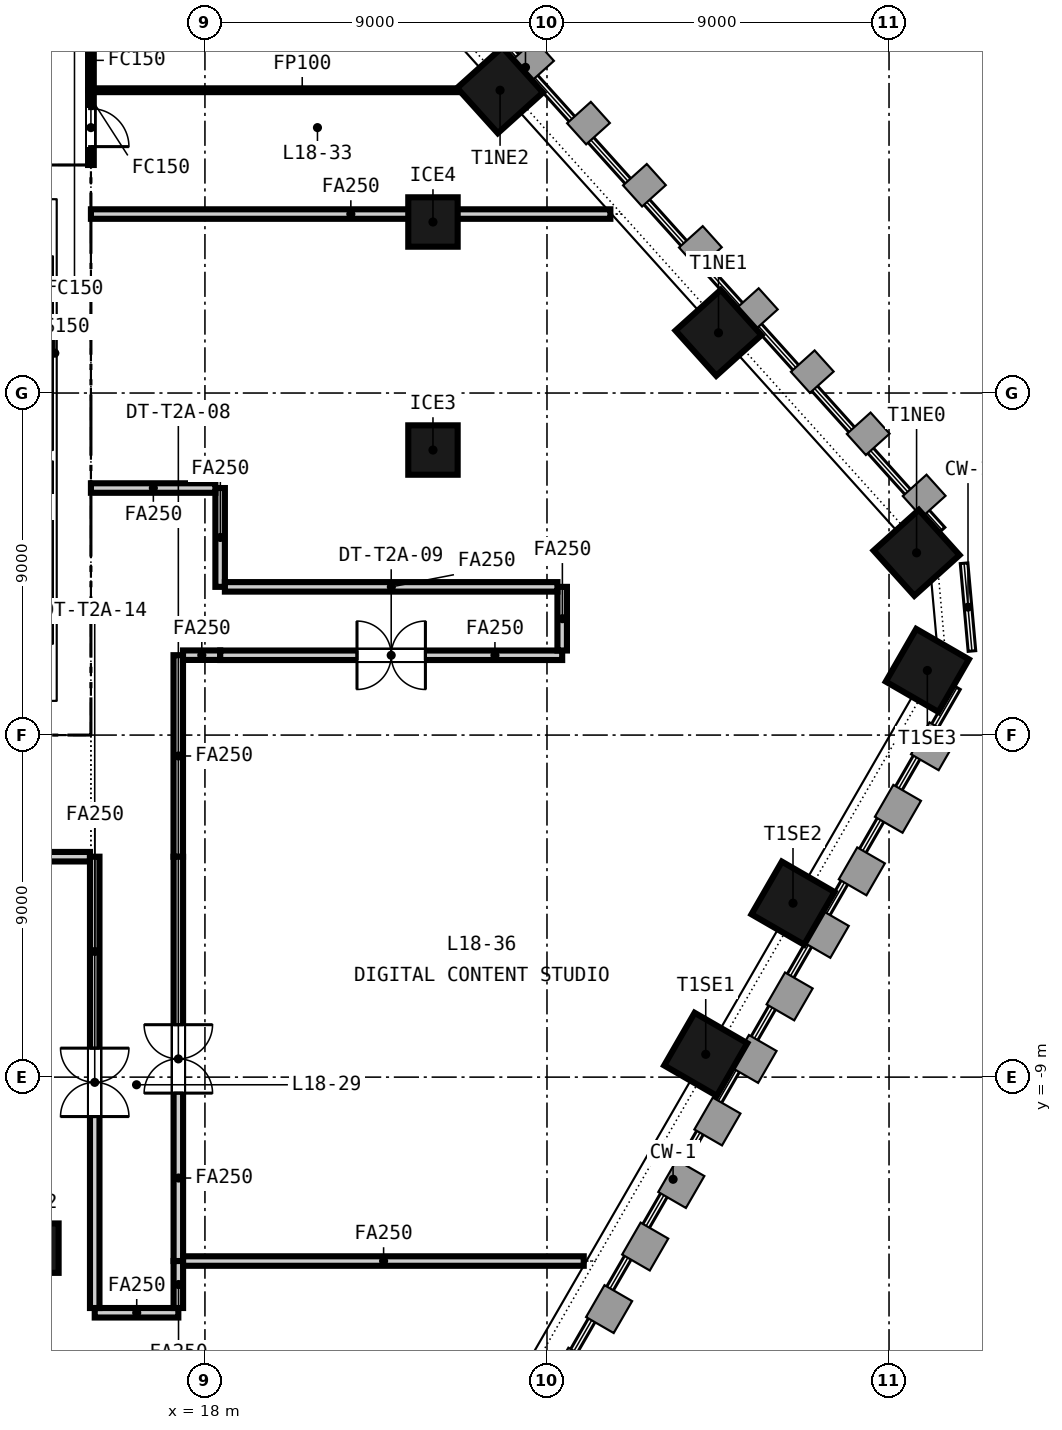
"""IFC4 building model, lengths in metres.
Left out: names, types, materials, properties, quantities, classifications, styles, units other than length and angle.
Written with IfcOpenShell. Run it as: python <this file> out.ifc"""

import sys

from ifc_helpers import new_model, si_unit, direction, frame, frame_2d, origin, origin_2d, place, context, subcontext, project, spatial, rectangle, extrude, element, fill, save


model = new_model("IFC4")
c1 = context("Model", 3, precision=1e-05, world=origin(), true_north=direction((0.0, 1.0)))
c2 = subcontext(c1, "Body", "Model", "MODEL_VIEW")
j1 = project(units=[si_unit("LENGTHUNIT", "METRE"), si_unit("PLANEANGLEUNIT", "RADIAN")], contexts=[c1])
p1 = place(None, origin())
s1 = spatial("IfcSite", under=j1, at=p1, CompositionType="ELEMENT")
p2 = place(p1, origin())
s2 = spatial("IfcBuilding", under=s1, at=p2, CompositionType="ELEMENT")
p3 = place(p2, frame((0.0, 0.0, 80.65)))
s3 = spatial("IfcBuildingStorey", under=s2, at=p3, CompositionType="ELEMENT", Elevation=80.65)
p4 = place(p3, frame((-15.0, 0.45, -0.15), z_axis=(0.0, 0.0, 1.0), x_axis=(1.0, 0.0, 0.0)))
e1 = element("IfcWall", 1, at=p4, inside=s3, PredefinedType="SOLIDWALL", context=c2, shape_type="SweptSolid", body=[
    extrude(rectangle(XDim=30.0, YDim=0.9, at=frame_2d((15.0, 0.0))), origin(), (0.0, 0.0, 1.0), 3.65),
])
p5 = place(p4, frame((5.8, 0.0, 0.15)))
e2 = element("IfcOpeningElement", 2, at=p5, cuts=e1, PredefinedType="OPENING", context=c2, shape_type="SweptSolid", body=[
    extrude(rectangle(XDim=2.4, YDim=2.4, at=frame_2d((1.2, 1.2))), frame((0.0, 0.46, 0.0), z_axis=(0.0, -1.0, 0.0), x_axis=(1.0, 0.0, 0.0)), (0.0, 0.0, 1.0), 0.92),
])
p6 = place(p4, frame((13.8, 0.0, 0.15)))
e3 = element("IfcOpeningElement", 3, at=p6, cuts=e1, PredefinedType="OPENING", context=c2, shape_type="SweptSolid", body=[
    extrude(rectangle(XDim=2.4, YDim=2.4, at=frame_2d((1.2, 1.2))), frame((0.0, 0.46, 0.0), z_axis=(0.0, -1.0, 0.0), x_axis=(1.0, 0.0, 0.0)), (0.0, 0.0, 1.0), 0.92),
])
p7 = place(p4, frame((21.8, 0.0, 0.15)))
e4 = element("IfcOpeningElement", 4, at=p7, cuts=e1, PredefinedType="OPENING", context=c2, shape_type="SweptSolid", body=[
    extrude(rectangle(XDim=2.4, YDim=2.4, at=frame_2d((1.2, 1.2))), frame((0.0, 0.46, 0.0), z_axis=(0.0, -1.0, 0.0), x_axis=(1.0, 0.0, 0.0)), (0.0, 0.0, 1.0), 0.92),
])
p8 = place(p4, frame((1.5, 0.0, 0.15)))
e5 = element("IfcOpeningElement", 5, at=p8, cuts=e1, PredefinedType="OPENING", context=c2, shape_type="SweptSolid", body=[
    extrude(rectangle(XDim=1.2, YDim=2.1, at=frame_2d((0.6, 1.05))), frame((0.0, 0.46, 0.0), z_axis=(0.0, -1.0, 0.0), x_axis=(1.0, 0.0, 0.0)), (0.0, 0.0, 1.0), 0.92),
])
p9 = place(p4, frame((27.3, 0.0, 0.15)))
e6 = element("IfcOpeningElement", 6, at=p9, cuts=e1, PredefinedType="OPENING", context=c2, shape_type="SweptSolid", body=[
    extrude(rectangle(XDim=1.2, YDim=2.1, at=frame_2d((0.6, 1.05))), frame((0.0, 0.46, 0.0), z_axis=(0.0, -1.0, 0.0), x_axis=(1.0, 0.0, 0.0)), (0.0, 0.0, 1.0), 0.92),
])
p10 = place(p3, frame((-15.0, 14.55, -0.15), z_axis=(0.0, 0.0, 1.0), x_axis=(1.0, 0.0, 0.0)))
e7 = element("IfcWall", 7, at=p10, inside=s3, PredefinedType="SOLIDWALL", context=c2, shape_type="SweptSolid", body=[
    extrude(rectangle(XDim=30.0, YDim=0.9, at=frame_2d((15.0, 0.0))), origin(), (0.0, 0.0, 1.0), 3.65),
])
p11 = place(p10, frame((9.25, 0.0, 0.15)))
e8 = element("IfcOpeningElement", 8, at=p11, cuts=e7, PredefinedType="OPENING", context=c2, shape_type="SweptSolid", body=[
    extrude(rectangle(XDim=1.5, YDim=2.1, at=frame_2d((0.75, 1.05))), frame((0.0, 0.46, 0.0), z_axis=(0.0, -1.0, 0.0), x_axis=(1.0, 0.0, 0.0)), (0.0, 0.0, 1.0), 0.92),
])
p12 = place(p10, frame((19.4, 0.0, 0.15)))
e9 = element("IfcOpeningElement", 9, at=p12, cuts=e7, PredefinedType="OPENING", context=c2, shape_type="SweptSolid", body=[
    extrude(rectangle(XDim=1.5, YDim=2.1, at=frame_2d((0.75, 1.05))), frame((0.0, 0.46, 0.0), z_axis=(0.0, -1.0, 0.0), x_axis=(1.0, 0.0, 0.0)), (0.0, 0.0, 1.0), 0.92),
])
p13 = place(p10, frame((1.5, 0.0, 0.15)))
e10 = element("IfcOpeningElement", 10, at=p13, cuts=e7, PredefinedType="OPENING", context=c2, shape_type="SweptSolid", body=[
    extrude(rectangle(XDim=1.2, YDim=2.1, at=frame_2d((0.6, 1.05))), frame((0.0, 0.46, 0.0), z_axis=(0.0, -1.0, 0.0), x_axis=(1.0, 0.0, 0.0)), (0.0, 0.0, 1.0), 0.92),
])
p14 = place(p10, frame((27.3, 0.0, 0.15)))
e11 = element("IfcOpeningElement", 11, at=p14, cuts=e7, PredefinedType="OPENING", context=c2, shape_type="SweptSolid", body=[
    extrude(rectangle(XDim=1.2, YDim=2.1, at=frame_2d((0.6, 1.05))), frame((0.0, 0.46, 0.0), z_axis=(0.0, -1.0, 0.0), x_axis=(1.0, 0.0, 0.0)), (0.0, 0.0, 1.0), 0.92),
])
p15 = place(p3, frame((14.55, 0.9, -0.15), z_axis=(0.0, 0.0, 1.0), x_axis=(0.0, 1.0, 0.0)))
e12 = element("IfcWall", 12, at=p15, inside=s3, PredefinedType="SOLIDWALL", context=c2, shape_type="SweptSolid", body=[
    extrude(rectangle(XDim=13.2, YDim=0.9, at=frame_2d((6.6, 0.0))), origin(), (0.0, 0.0, 1.0), 3.65),
])
for number, where, z_axis, x_axis in (
    (13, (31.177, -8.4, -0.15), (0.0, 0.0, 1.0), (0.5, 0.866, 0.0)),
    (14, (33.473, -4.422, -0.15), (0.0, 0.0, 1.0), (0.5, 0.866, 0.0)),
    (15, (37.008, 1.7, -0.15), (0.0, 0.0, 1.0), (0.5, 0.866, 0.0)),
    (16, (36.725, 4.795, -0.15), (0.0, 0.0, 1.0), (-0.669, 0.743, 0.0)),
    (17, (31.513, 10.584, -0.15), (0.0, 0.0, 1.0), (-0.669, 0.743, 0.0)),
    (18, (25.765, 16.967, -0.15), (0.0, 0.0, 1.0), (-0.669, 0.743, 0.0)),
):
    element("IfcColumn", number, at=place(p3, frame(where, z_axis=z_axis, x_axis=x_axis)), inside=s3, PredefinedType="COLUMN", context=c2, shape_type="SweptSolid", body=[
        extrude(rectangle(XDim=1.6, YDim=1.6, at=origin_2d()), origin(), (0.0, 0.0, 1.0), 3.65),
    ])
for number, where, z_axis, x_axis in (
    (19, (13.5, -13.5, -0.15), (0.0, 0.0, 1.0), (1.0, 0.0, 0.0)),
    (20, (24.0, 7.5, -0.15), (0.0, 0.0, 1.0), (1.0, 0.0, 0.0)),
    (21, (24.0, 13.5, -0.15), (0.0, 0.0, 1.0), (1.0, 0.0, 0.0)),
):
    element("IfcColumn", number, at=place(p3, frame(where, z_axis=z_axis, x_axis=x_axis)), inside=s3, PredefinedType="COLUMN", context=c2, shape_type="SweptSolid", body=[
        extrude(rectangle(XDim=1.3, YDim=1.3, at=origin_2d()), origin(), (0.0, 0.0, 1.0), 3.65),
    ])
p16 = place(p3, frame((11.05, 7.35, 0.0), z_axis=(0.0, 0.0, 1.0), x_axis=(1.0, 0.0, 0.0)))
e22 = element("IfcWall", 22, at=p16, inside=s3, PredefinedType="SOLIDWALL", context=c2, shape_type="SweptSolid", body=[
    extrude(rectangle(XDim=2.95, YDim=0.3, at=frame_2d((1.475, 0.0))), origin(), (0.0, 0.0, 1.0), 3.5),
])
p17 = place(p3, frame((14.05, 0.9, 0.0), z_axis=(0.0, 0.0, 1.0), x_axis=(0.0, 1.0, 0.0)))
e23 = element("IfcWall", 23, at=p17, inside=s3, PredefinedType="SOLIDWALL", context=c2, shape_type="SweptSolid", body=[
    extrude(rectangle(XDim=13.2, YDim=0.1, at=frame_2d((6.6, 0.0))), origin(), (0.0, 0.0, 1.0), 3.5),
])
p18 = place(p3, frame((14.975, -3.2, 0.0), z_axis=(0.0, 0.0, 1.0), x_axis=(-1.0, 0.0, 0.0)))
e24 = element("IfcWall", 24, at=p18, inside=s3, PredefinedType="PARTITIONING", context=c2, shape_type="SweptSolid", body=[
    extrude(rectangle(XDim=4.762, YDim=0.25, at=frame_2d((2.381, 0.0))), origin(), (0.0, 0.0, 1.0), 2.741),
])
p19 = place(p18, frame((1.469, 0.0, 0.0)))
e25 = element("IfcOpeningElement", 25, at=p19, cuts=e24, PredefinedType="OPENING", context=c2, shape_type="SweptSolid", body=[
    extrude(rectangle(XDim=1.8, YDim=2.1, at=frame_2d((0.9, 1.05))), frame((0.0, 0.135, 0.0), z_axis=(0.0, -1.0, 0.0), x_axis=(1.0, 0.0, 0.0)), (0.0, 0.0, 1.0), 0.27),
])
p20 = place(p3, frame((15.0, 18.54, 0.0), z_axis=(0.0, 0.0, 1.0), x_axis=(0.0, -1.0, 0.0)))
e26 = element("IfcWall", 26, at=p20, inside=s3, PredefinedType="PARTITIONING", context=c2, shape_type="SweptSolid", body=[
    extrude(rectangle(XDim=1.573, YDim=0.15, at=frame_2d((0.787, 0.0))), origin(), (0.0, 0.0, 1.0), 2.741),
])
p21 = place(p3, frame((15.0, 16.967, 0.0), z_axis=(0.0, 0.0, 1.0), x_axis=(0.0, -1.0, 0.0)))
e27 = element("IfcWall", 27, at=p21, inside=s3, PredefinedType="PARTITIONING", context=c2, shape_type="SweptSolid", body=[
    extrude(rectangle(XDim=1.967, YDim=0.15, at=frame_2d((0.983, 0.0))), origin(), (0.0, 0.0, 1.0), 2.741),
])
p22 = place(p21, frame((0.483, 0.0, 0.0)))
e28 = element("IfcOpeningElement", 28, at=p22, cuts=e27, PredefinedType="OPENING", context=c2, shape_type="SweptSolid", body=[
    extrude(rectangle(XDim=1.0, YDim=2.1, at=frame_2d((0.5, 1.05))), frame((0.0, 0.085, 0.0), z_axis=(0.0, -1.0, 0.0), x_axis=(1.0, 0.0, 0.0)), (0.0, 0.0, 1.0), 0.17),
])
p23 = place(p3, frame((17.298, 2.102, 0.0), z_axis=(0.0, 0.0, 1.0), x_axis=(0.0, -1.0, 0.0)))
e29 = element("IfcWall", 29, at=p23, inside=s3, PredefinedType="PARTITIONING", context=c2, shape_type="SweptSolid", body=[
    extrude(rectangle(XDim=5.304, YDim=0.25, at=frame_2d((2.652, 0.0))), origin(), (0.0, 0.0, 1.0), 2.741),
])
p24 = place(p3, frame((18.402, 2.102, 0.0), z_axis=(0.0, 0.0, 1.0), x_axis=(-1.0, 0.0, 0.0)))
e30 = element("IfcWall", 30, at=p24, inside=s3, PredefinedType="PARTITIONING", context=c2, shape_type="SweptSolid", body=[
    extrude(rectangle(XDim=0.979, YDim=0.25, at=frame_2d((0.49, 0.0))), origin(), (0.0, 0.0, 1.0), 2.741),
])
p25 = place(p3, frame((17.3, -3.202, 0.0), z_axis=(0.0, 0.0, 1.0), x_axis=(0.0, -1.0, 0.0)))
e31 = element("IfcWall", 31, at=p25, inside=s3, PredefinedType="PARTITIONING", context=c2, shape_type="SweptSolid", body=[
    extrude(rectangle(XDim=10.637, YDim=0.25, at=frame_2d((5.319, 0.0))), origin(), (0.0, 0.0, 1.0), 2.741),
])
p26 = place(p25, frame((4.418, 0.0, 0.0)))
e32 = element("IfcOpeningElement", 32, at=p26, cuts=e31, PredefinedType="OPENING", context=c2, shape_type="SweptSolid", body=[
    extrude(rectangle(XDim=1.8, YDim=2.1, at=frame_2d((0.9, 1.05))), frame((0.0, 0.135, 0.0), z_axis=(0.0, -1.0, 0.0), x_axis=(1.0, 0.0, 0.0)), (0.0, 0.0, 1.0), 0.27),
])
p27 = place(p3, frame((18.4, 6.5, 0.0), z_axis=(0.0, 0.0, 1.0), x_axis=(0.0, -1.0, 0.0)))
e33 = element("IfcWall", 33, at=p27, inside=s3, PredefinedType="PARTITIONING", context=c2, shape_type="SweptSolid", body=[
    extrude(rectangle(XDim=2.6, YDim=0.25, at=frame_2d((1.3, 0.0))), origin(), (0.0, 0.0, 1.0), 2.741),
])
p28 = place(p3, frame((27.4, 2.1, 0.0), z_axis=(0.0, 0.0, 1.0), x_axis=(-1.0, 0.0, 0.0)))
e34 = element("IfcWall", 34, at=p28, inside=s3, PredefinedType="PARTITIONING", context=c2, shape_type="SweptSolid", body=[
    extrude(rectangle(XDim=8.998, YDim=0.25, at=frame_2d((4.499, 0.0))), origin(), (0.0, 0.0, 1.0), 2.741),
])
p29 = place(p28, frame((3.599, 0.0, 0.0)))
e35 = element("IfcOpeningElement", 35, at=p29, cuts=e34, PredefinedType="OPENING", context=c2, shape_type="SweptSolid", body=[
    extrude(rectangle(XDim=1.8, YDim=2.1, at=frame_2d((0.9, 1.05))), frame((0.0, 0.135, 0.0), z_axis=(0.0, -1.0, 0.0), x_axis=(1.0, 0.0, 0.0)), (0.0, 0.0, 1.0), 0.27),
])
p30 = place(p3, frame((27.4, 3.9, 0.0), z_axis=(0.0, 0.0, 1.0), x_axis=(0.0, -1.0, 0.0)))
e36 = element("IfcWall", 36, at=p30, inside=s3, PredefinedType="PARTITIONING", context=c2, shape_type="SweptSolid", body=[
    extrude(rectangle(XDim=1.675, YDim=0.25, at=frame_2d((0.837, 0.0))), origin(), (0.0, 0.0, 1.0), 2.741),
])
p31 = place(p3, frame((17.3, -15.2, 0.0), z_axis=(0.0, 0.0, 1.0), x_axis=(-1.0, 0.0, 0.0)))
e37 = element("IfcWall", 37, at=p31, inside=s3, PredefinedType="PARTITIONING", context=c2, shape_type="SweptSolid", body=[
    extrude(rectangle(XDim=2.2, YDim=0.25, at=frame_2d((1.1, 0.0))), origin(), (0.0, 0.0, 1.0), 2.741),
])
p32 = place(p3, frame((17.3, -13.839, 0.0), z_axis=(0.0, 0.0, 1.0), x_axis=(0.0, -1.0, 0.0)))
e38 = element("IfcWall", 38, at=p32, inside=s3, PredefinedType="PARTITIONING", context=c2, shape_type="SweptSolid", body=[
    extrude(rectangle(XDim=1.236, YDim=0.25, at=frame_2d((0.618, 0.0))), origin(), (0.0, 0.0, 1.0), 2.741),
])
p33 = place(p3, frame((15.075, 16.967, 0.0), z_axis=(0.0, 0.0, 1.0), x_axis=(1.0, 0.0, 0.0)))
e39 = element("IfcWall", 39, at=p33, inside=s3, PredefinedType="PARTITIONING", context=c2, shape_type="SweptSolid", body=[
    extrude(rectangle(XDim=10.96, YDim=0.1, at=frame_2d((5.48, 0.0))), origin(), (0.0, 0.0, 1.0), 2.741),
])
p34 = place(p3, frame((15.0, 13.709, 0.0), z_axis=(0.0, 0.0, 1.0), x_axis=(1.0, 0.0, 0.0)))
e40 = element("IfcWall", 40, at=p34, inside=s3, PredefinedType="PARTITIONING", context=c2, shape_type="SweptSolid", body=[
    extrude(rectangle(XDim=13.668, YDim=0.25, at=frame_2d((6.834, 0.0))), origin(), (0.0, 0.0, 1.0), 2.741),
])
p35 = place(p3, frame((15.0, 6.5, 0.0), z_axis=(0.0, 0.0, 1.0), x_axis=(1.0, 0.0, 0.0)))
e41 = element("IfcWall", 41, at=p35, inside=s3, PredefinedType="PARTITIONING", context=c2, shape_type="SweptSolid", body=[
    extrude(rectangle(XDim=3.275, YDim=0.25, at=frame_2d((1.637, 0.0))), origin(), (0.0, 0.0, 1.0), 2.741),
])
p36 = place(p3, frame((18.525, 3.9, 0.0), z_axis=(0.0, 0.0, 1.0), x_axis=(1.0, 0.0, 0.0)))
e42 = element("IfcWall", 42, at=p36, inside=s3, PredefinedType="PARTITIONING", context=c2, shape_type="SweptSolid", body=[
    extrude(rectangle(XDim=8.75, YDim=0.25, at=frame_2d((4.375, 0.0))), origin(), (0.0, 0.0, 1.0), 2.741),
])
p37 = place(p3, frame((17.425, -13.839, 0.0), z_axis=(0.0, 0.0, 1.0), x_axis=(1.0, 0.0, 0.0)))
e43 = element("IfcWall", 43, at=p37, inside=s3, PredefinedType="PARTITIONING", context=c2, shape_type="SweptSolid", body=[
    extrude(rectangle(XDim=10.542, YDim=0.25, at=frame_2d((5.271, 0.0))), origin(), (0.0, 0.0, 1.0), 2.741),
])
p38 = place(p3, frame((15.1, -15.075, 0.0), z_axis=(0.0, 0.0, 1.0), x_axis=(0.0, 1.0, 0.0)))
e44 = element("IfcWall", 44, at=p38, inside=s3, PredefinedType="PARTITIONING", context=c2, shape_type="SweptSolid", body=[
    extrude(rectangle(XDim=11.875, YDim=0.25, at=frame_2d((5.938, 0.0))), origin(), (0.0, 0.0, 1.0), 2.741),
])
p39 = place(p38, frame((5.038, 0.0, 0.0)))
e45 = element("IfcOpeningElement", 45, at=p39, cuts=e44, PredefinedType="OPENING", context=c2, shape_type="SweptSolid", body=[
    extrude(rectangle(XDim=1.8, YDim=2.1, at=frame_2d((0.9, 1.05))), frame((0.0, 0.135, 0.0), z_axis=(0.0, -1.0, 0.0), x_axis=(1.0, 0.0, 0.0)), (0.0, 0.0, 1.0), 0.27),
])
p40 = place(p22, origin())
e46 = element("IfcDoor", 46, at=p40, inside=s3, OperationType="SINGLE_SWING_RIGHT", PredefinedType="DOOR", context=c2, shape_type="SweptSolid", body=[
    extrude(rectangle(XDim=1.0, YDim=2.1, at=frame_2d((0.5, 1.05))), frame((0.0, 0.025, 0.0), z_axis=(0.0, -1.0, 0.0), x_axis=(1.0, 0.0, 0.0)), (0.0, 0.0, 1.0), 0.05),
])
fill(e28, e46)
p41 = place(p26, origin())
e47 = element("IfcDoor", 47, at=p41, inside=s3, OperationType="DOUBLE_DOOR_DOUBLE_SWING", PredefinedType="DOOR", context=c2, shape_type="SweptSolid", body=[
    extrude(rectangle(XDim=1.8, YDim=2.1, at=frame_2d((0.9, 1.05))), frame((0.0, 0.025, 0.0), z_axis=(0.0, -1.0, 0.0), x_axis=(1.0, 0.0, 0.0)), (0.0, 0.0, 1.0), 0.05),
])
fill(e32, e47)
p42 = place(p29, origin())
e48 = element("IfcDoor", 48, at=p42, inside=s3, OperationType="DOUBLE_DOOR_DOUBLE_SWING", PredefinedType="DOOR", context=c2, shape_type="SweptSolid", body=[
    extrude(rectangle(XDim=1.8, YDim=2.1, at=frame_2d((0.9, 1.05))), frame((0.0, 0.025, 0.0), z_axis=(0.0, -1.0, 0.0), x_axis=(1.0, 0.0, 0.0)), (0.0, 0.0, 1.0), 0.05),
])
fill(e35, e48)
p43 = place(p39, origin())
e49 = element("IfcDoor", 49, at=p43, inside=s3, OperationType="DOUBLE_DOOR_DOUBLE_SWING", PredefinedType="DOOR", context=c2, shape_type="SweptSolid", body=[
    extrude(rectangle(XDim=1.8, YDim=2.1, at=frame_2d((0.9, 1.05))), frame((0.0, 0.025, 0.0), z_axis=(0.0, -1.0, 0.0), x_axis=(1.0, 0.0, 0.0)), (0.0, 0.0, 1.0), 0.05),
])
fill(e45, e49)
save(model, sys.argv[1])
